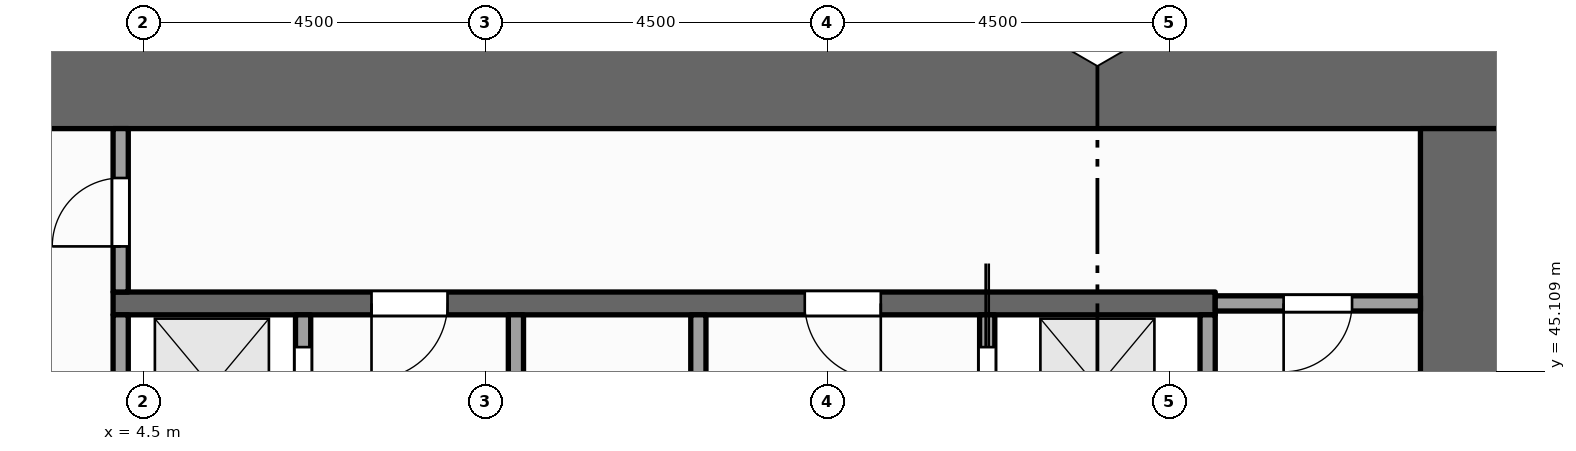
"""IFC4 building model, lengths in metres.
Left out: names, types, materials, properties, quantities, classifications, styles, units other than length and angle.
Written with IfcOpenShell. Run it as: python <this file> out.ifc"""

import sys

from ifc_helpers import new_model, si_unit, direction, frame, frame_2d, origin, place, context, subcontext, project, spatial, rectangle, extrude, element, fill, save


model = new_model("IFC4")
c1 = context("Model", 3, precision=1e-05, world=origin(), true_north=direction((0.0, 1.0)))
c2 = subcontext(c1, "Body", "Model", "MODEL_VIEW")
j1 = project(units=[si_unit("LENGTHUNIT", "METRE"), si_unit("PLANEANGLEUNIT", "RADIAN")], contexts=[c1])
p1 = place(None, origin())
s1 = spatial("IfcSite", under=j1, at=p1, CompositionType="ELEMENT")
p2 = place(p1, origin())
s2 = spatial("IfcBuilding", under=s1, at=p2, CompositionType="ELEMENT")
p3 = place(p2, frame((0.0, 0.0, 41.0)))
s3 = spatial("IfcBuildingStorey", under=s2, at=p3, CompositionType="ELEMENT", Elevation=41.0)
p4 = place(p3, frame((0.0, 48.9, -0.15), z_axis=(0.0, 0.0, 1.0), x_axis=(1.0, 0.0, 0.0)))
e1 = element("IfcWall", 1, at=p4, inside=s3, PredefinedType="SHEAR", context=c2, shape_type="SweptSolid", body=[
    extrude(rectangle(XDim=22.5, YDim=1.2, at=frame_2d((11.25, 0.0))), origin(), (0.0, 0.0, 1.0), 4.0),
])
p5 = place(p3, frame((21.9, 37.2, -0.15), z_axis=(0.0, 0.0, 1.0), x_axis=(0.0, 1.0, 0.0)))
e2 = element("IfcWall", 2, at=p5, inside=s3, PredefinedType="SHEAR", context=c2, shape_type="SweptSolid", body=[
    extrude(rectangle(XDim=11.1, YDim=1.2, at=frame_2d((5.55, 0.0))), origin(), (0.0, 0.0, 1.0), 4.0),
])
p6 = place(p3, frame((4.2, 43.525, 0.0), z_axis=(0.0, 0.0, 1.0), x_axis=(0.0, 1.0, 0.0)))
e3 = element("IfcWall", 3, at=p6, inside=s3, PredefinedType="SOLIDWALL", context=c2, shape_type="SweptSolid", body=[
    extrude(rectangle(XDim=2.325, YDim=0.2, at=frame_2d((1.163, 0.0))), origin(), (0.0, 0.0, 1.0), 3.85),
])
p7 = place(p3, frame((4.2, 46.15, 0.0), z_axis=(0.0, 0.0, 1.0), x_axis=(0.0, 1.0, 0.0)))
e4 = element("IfcWall", 4, at=p7, inside=s3, PredefinedType="PARTITIONING", context=c2, shape_type="SweptSolid", body=[
    extrude(rectangle(XDim=2.15, YDim=0.2, at=frame_2d((1.075, 0.0))), origin(), (0.0, 0.0, 1.0), 3.85),
])
p8 = place(p7, frame((0.6, 0.0, 0.0)))
e5 = element("IfcOpeningElement", 5, at=p8, cuts=e4, PredefinedType="OPENING", context=c2, shape_type="SweptSolid", body=[
    extrude(rectangle(XDim=0.9, YDim=2.1, at=frame_2d((0.45, 1.05))), frame((0.0, 0.11, 0.0), z_axis=(0.0, -1.0, 0.0), x_axis=(1.0, 0.0, 0.0)), (0.0, 0.0, 1.0), 0.22),
])
p9 = place(p3, frame((6.6, 37.2, 0.0), z_axis=(0.0, 0.0, 1.0), x_axis=(0.0, 1.0, 0.0)))
e6 = element("IfcWall", 6, at=p9, inside=s3, PredefinedType="SOLIDWALL", context=c2, shape_type="SweptSolid", body=[
    extrude(rectangle(XDim=8.65, YDim=0.2, at=frame_2d((4.325, 0.0))), origin(), (0.0, 0.0, 1.0), 3.85),
])
p10 = place(p9, frame((0.5, 0.0, 0.012)))
e7 = element("IfcOpeningElement", 7, at=p10, cuts=e6, PredefinedType="OPENING", context=c2, shape_type="SweptSolid", body=[
    extrude(rectangle(XDim=1.1, YDim=2.1, at=frame_2d((0.55, 1.05))), frame((0.0, 0.11, 0.0), z_axis=(0.0, -1.0, 0.0), x_axis=(1.0, 0.0, 0.0)), (0.0, 0.0, 1.0), 0.22),
])
p11 = place(p9, frame((2.75, 0.0, 0.012)))
e8 = element("IfcOpeningElement", 8, at=p11, cuts=e6, PredefinedType="OPENING", context=c2, shape_type="SweptSolid", body=[
    extrude(rectangle(XDim=1.1, YDim=2.1, at=frame_2d((0.55, 1.05))), frame((0.0, 0.11, 0.0), z_axis=(0.0, -1.0, 0.0), x_axis=(1.0, 0.0, 0.0)), (0.0, 0.0, 1.0), 0.22),
])
p12 = place(p9, frame((4.95, 0.0, 0.012)))
e9 = element("IfcOpeningElement", 9, at=p12, cuts=e6, PredefinedType="OPENING", context=c2, shape_type="SweptSolid", body=[
    extrude(rectangle(XDim=1.1, YDim=2.1, at=frame_2d((0.55, 1.05))), frame((0.0, 0.11, 0.0), z_axis=(0.0, -1.0, 0.0), x_axis=(1.0, 0.0, 0.0)), (0.0, 0.0, 1.0), 0.22),
])
p13 = place(p9, frame((7.125, 0.0, 0.012)))
e10 = element("IfcOpeningElement", 10, at=p13, cuts=e6, PredefinedType="OPENING", context=c2, shape_type="SweptSolid", body=[
    extrude(rectangle(XDim=1.1, YDim=2.1, at=frame_2d((0.55, 1.05))), frame((0.0, 0.11, 0.0), z_axis=(0.0, -1.0, 0.0), x_axis=(1.0, 0.0, 0.0)), (0.0, 0.0, 1.0), 0.22),
])
p14 = place(p3, frame((9.4, 37.2, 0.0), z_axis=(0.0, 0.0, 1.0), x_axis=(0.0, 1.0, 0.0)))
e11 = element("IfcWall", 11, at=p14, inside=s3, PredefinedType="PARTITIONING", context=c2, shape_type="SweptSolid", body=[
    extrude(rectangle(XDim=8.65, YDim=0.2, at=frame_2d((4.325, 0.0))), origin(), (0.0, 0.0, 1.0), 3.85),
])
p15 = place(p14, frame((1.7, 0.0, 0.0)))
e12 = element("IfcOpeningElement", 12, at=p15, cuts=e11, PredefinedType="OPENING", context=c2, shape_type="SweptSolid", body=[
    extrude(rectangle(XDim=0.9, YDim=2.1, at=frame_2d((0.45, 1.05))), frame((0.0, 0.11, 0.0), z_axis=(0.0, -1.0, 0.0), x_axis=(1.0, 0.0, 0.0)), (0.0, 0.0, 1.0), 0.22),
])
p16 = place(p14, frame((6.125, 0.0, 0.0)))
e13 = element("IfcOpeningElement", 13, at=p16, cuts=e11, PredefinedType="OPENING", context=c2, shape_type="SweptSolid", body=[
    extrude(rectangle(XDim=0.9, YDim=2.1, at=frame_2d((0.45, 1.05))), frame((0.0, 0.11, 0.0), z_axis=(0.0, -1.0, 0.0), x_axis=(1.0, 0.0, 0.0)), (0.0, 0.0, 1.0), 0.22),
])
p17 = place(p3, frame((11.8, 37.2, 0.0), z_axis=(0.0, 0.0, 1.0), x_axis=(0.0, 1.0, 0.0)))
e14 = element("IfcWall", 14, at=p17, inside=s3, PredefinedType="PARTITIONING", context=c2, shape_type="SweptSolid", body=[
    extrude(rectangle(XDim=8.65, YDim=0.2, at=frame_2d((4.325, 0.0))), origin(), (0.0, 0.0, 1.0), 3.85),
])
p18 = place(p3, frame((15.6, 43.7, 0.0), z_axis=(0.0, 0.0, 1.0), x_axis=(0.0, 1.0, 0.0)))
e15 = element("IfcWall", 15, at=p18, inside=s3, PredefinedType="SOLIDWALL", context=c2, shape_type="SweptSolid", body=[
    extrude(rectangle(XDim=2.15, YDim=0.2, at=frame_2d((1.075, 0.0))), origin(), (0.0, 0.0, 1.0), 3.85),
])
p19 = place(p18, frame((0.625, 0.0, 0.012)))
e16 = element("IfcOpeningElement", 16, at=p19, cuts=e15, PredefinedType="OPENING", context=c2, shape_type="SweptSolid", body=[
    extrude(rectangle(XDim=1.1, YDim=2.1, at=frame_2d((0.55, 1.05))), frame((0.0, 0.11, 0.0), z_axis=(0.0, -1.0, 0.0), x_axis=(1.0, 0.0, 0.0)), (0.0, 0.0, 1.0), 0.22),
])
p20 = place(p3, frame((18.5, 43.7, 0.0), z_axis=(0.0, 0.0, 1.0), x_axis=(0.0, 1.0, 0.0)))
e17 = element("IfcWall", 17, at=p20, inside=s3, PredefinedType="SOLIDWALL", context=c2, shape_type="SweptSolid", body=[
    extrude(rectangle(XDim=2.15, YDim=0.2, at=frame_2d((1.075, 0.0))), origin(), (0.0, 0.0, 1.0), 3.85),
])
p21 = place(p3, frame((4.1, 46.0, 0.0), z_axis=(0.0, 0.0, 1.0), x_axis=(1.0, 0.0, 0.0)))
e18 = element("IfcWall", 18, at=p21, inside=s3, PredefinedType="SHEAR", context=c2, shape_type="SweptSolid", body=[
    extrude(rectangle(XDim=14.5, YDim=0.3, at=frame_2d((7.25, 0.0))), origin(), (0.0, 0.0, 1.0), 3.85),
])
p22 = place(p21, frame((3.4, 0.0, 0.0)))
e19 = element("IfcOpeningElement", 19, at=p22, cuts=e18, PredefinedType="OPENING", context=c2, shape_type="SweptSolid", body=[
    extrude(rectangle(XDim=1.0, YDim=2.1, at=frame_2d((0.5, 1.05))), frame((0.0, 0.16, 0.0), z_axis=(0.0, -1.0, 0.0), x_axis=(1.0, 0.0, 0.0)), (0.0, 0.0, 1.0), 0.32),
])
p23 = place(p21, frame((9.1, 0.0, 0.0)))
e20 = element("IfcOpeningElement", 20, at=p23, cuts=e18, PredefinedType="OPENING", context=c2, shape_type="SweptSolid", body=[
    extrude(rectangle(XDim=1.0, YDim=2.1, at=frame_2d((0.5, 1.05))), frame((0.0, 0.16, 0.0), z_axis=(0.0, -1.0, 0.0), x_axis=(1.0, 0.0, 0.0)), (0.0, 0.0, 1.0), 0.32),
])
p24 = place(p3, frame((18.6, 46.0, 0.0), z_axis=(0.0, 0.0, 1.0), x_axis=(1.0, 0.0, 0.0)))
e21 = element("IfcWall", 21, at=p24, inside=s3, PredefinedType="PARTITIONING", context=c2, shape_type="SweptSolid", body=[
    extrude(rectangle(XDim=2.7, YDim=0.2, at=frame_2d((1.35, 0.0))), origin(), (0.0, 0.0, 1.0), 3.85),
])
p25 = place(p24, frame((0.9, 0.0, 0.0)))
e22 = element("IfcOpeningElement", 22, at=p25, cuts=e21, PredefinedType="OPENING", context=c2, shape_type="SweptSolid", body=[
    extrude(rectangle(XDim=0.9, YDim=2.1, at=frame_2d((0.45, 1.05))), frame((0.0, 0.11, 0.0), z_axis=(0.0, -1.0, 0.0), x_axis=(1.0, 0.0, 0.0)), (0.0, 0.0, 1.0), 0.22),
])
p26 = place(p13, origin())
e23 = element("IfcDoor", 23, at=p26, inside=s3, OperationType="SLIDING_TO_LEFT", PredefinedType="DOOR", context=c2, shape_type="SweptSolid", body=[
    extrude(rectangle(XDim=1.1, YDim=2.1, at=frame_2d((0.55, 1.05))), frame((0.0, 0.025, 0.0), z_axis=(0.0, -1.0, 0.0), x_axis=(1.0, 0.0, 0.0)), (0.0, 0.0, 1.0), 0.05),
])
fill(e10, e23)
p27 = place(p19, origin())
e24 = element("IfcDoor", 24, at=p27, inside=s3, OperationType="SLIDING_TO_RIGHT", PredefinedType="DOOR", context=c2, shape_type="SweptSolid", body=[
    extrude(rectangle(XDim=1.1, YDim=2.1, at=frame_2d((0.55, 1.05))), frame((0.0, 0.025, 0.0), z_axis=(0.0, -1.0, 0.0), x_axis=(1.0, 0.0, 0.0)), (0.0, 0.0, 1.0), 0.05),
])
fill(e16, e24)
p28 = place(p22, origin())
e25 = element("IfcDoor", 25, at=p28, inside=s3, OperationType="SINGLE_SWING_LEFT", PredefinedType="DOOR", context=c2, shape_type="SweptSolid", body=[
    extrude(rectangle(XDim=1.0, YDim=2.1, at=frame_2d((0.5, 1.05))), frame((0.0, 0.025, 0.0), z_axis=(0.0, -1.0, 0.0), x_axis=(1.0, 0.0, 0.0)), (0.0, 0.0, 1.0), 0.05),
])
fill(e19, e25)
p29 = place(p23, origin())
e26 = element("IfcDoor", 26, at=p29, inside=s3, OperationType="SINGLE_SWING_RIGHT", PredefinedType="DOOR", context=c2, shape_type="SweptSolid", body=[
    extrude(rectangle(XDim=1.0, YDim=2.1, at=frame_2d((0.5, 1.05))), frame((0.0, 0.025, 0.0), z_axis=(0.0, -1.0, 0.0), x_axis=(1.0, 0.0, 0.0)), (0.0, 0.0, 1.0), 0.05),
])
fill(e20, e26)
p30 = place(p8, origin())
e27 = element("IfcDoor", 27, at=p30, inside=s3, OperationType="SINGLE_SWING_LEFT", PredefinedType="DOOR", context=c2, shape_type="SweptSolid", body=[
    extrude(rectangle(XDim=0.9, YDim=2.1, at=frame_2d((0.45, 1.05))), frame((0.0, 0.025, 0.0), z_axis=(0.0, -1.0, 0.0), x_axis=(1.0, 0.0, 0.0)), (0.0, 0.0, 1.0), 0.05),
])
fill(e5, e27)
p31 = place(p25, origin())
e28 = element("IfcDoor", 28, at=p31, inside=s3, OperationType="SINGLE_SWING_LEFT", PredefinedType="DOOR", context=c2, shape_type="SweptSolid", body=[
    extrude(rectangle(XDim=0.9, YDim=2.1, at=frame_2d((0.45, 1.05))), frame((0.0, 0.025, 0.0), z_axis=(0.0, -1.0, 0.0), x_axis=(1.0, 0.0, 0.0)), (0.0, 0.0, 1.0), 0.05),
])
fill(e22, e28)
save(model, sys.argv[1])
